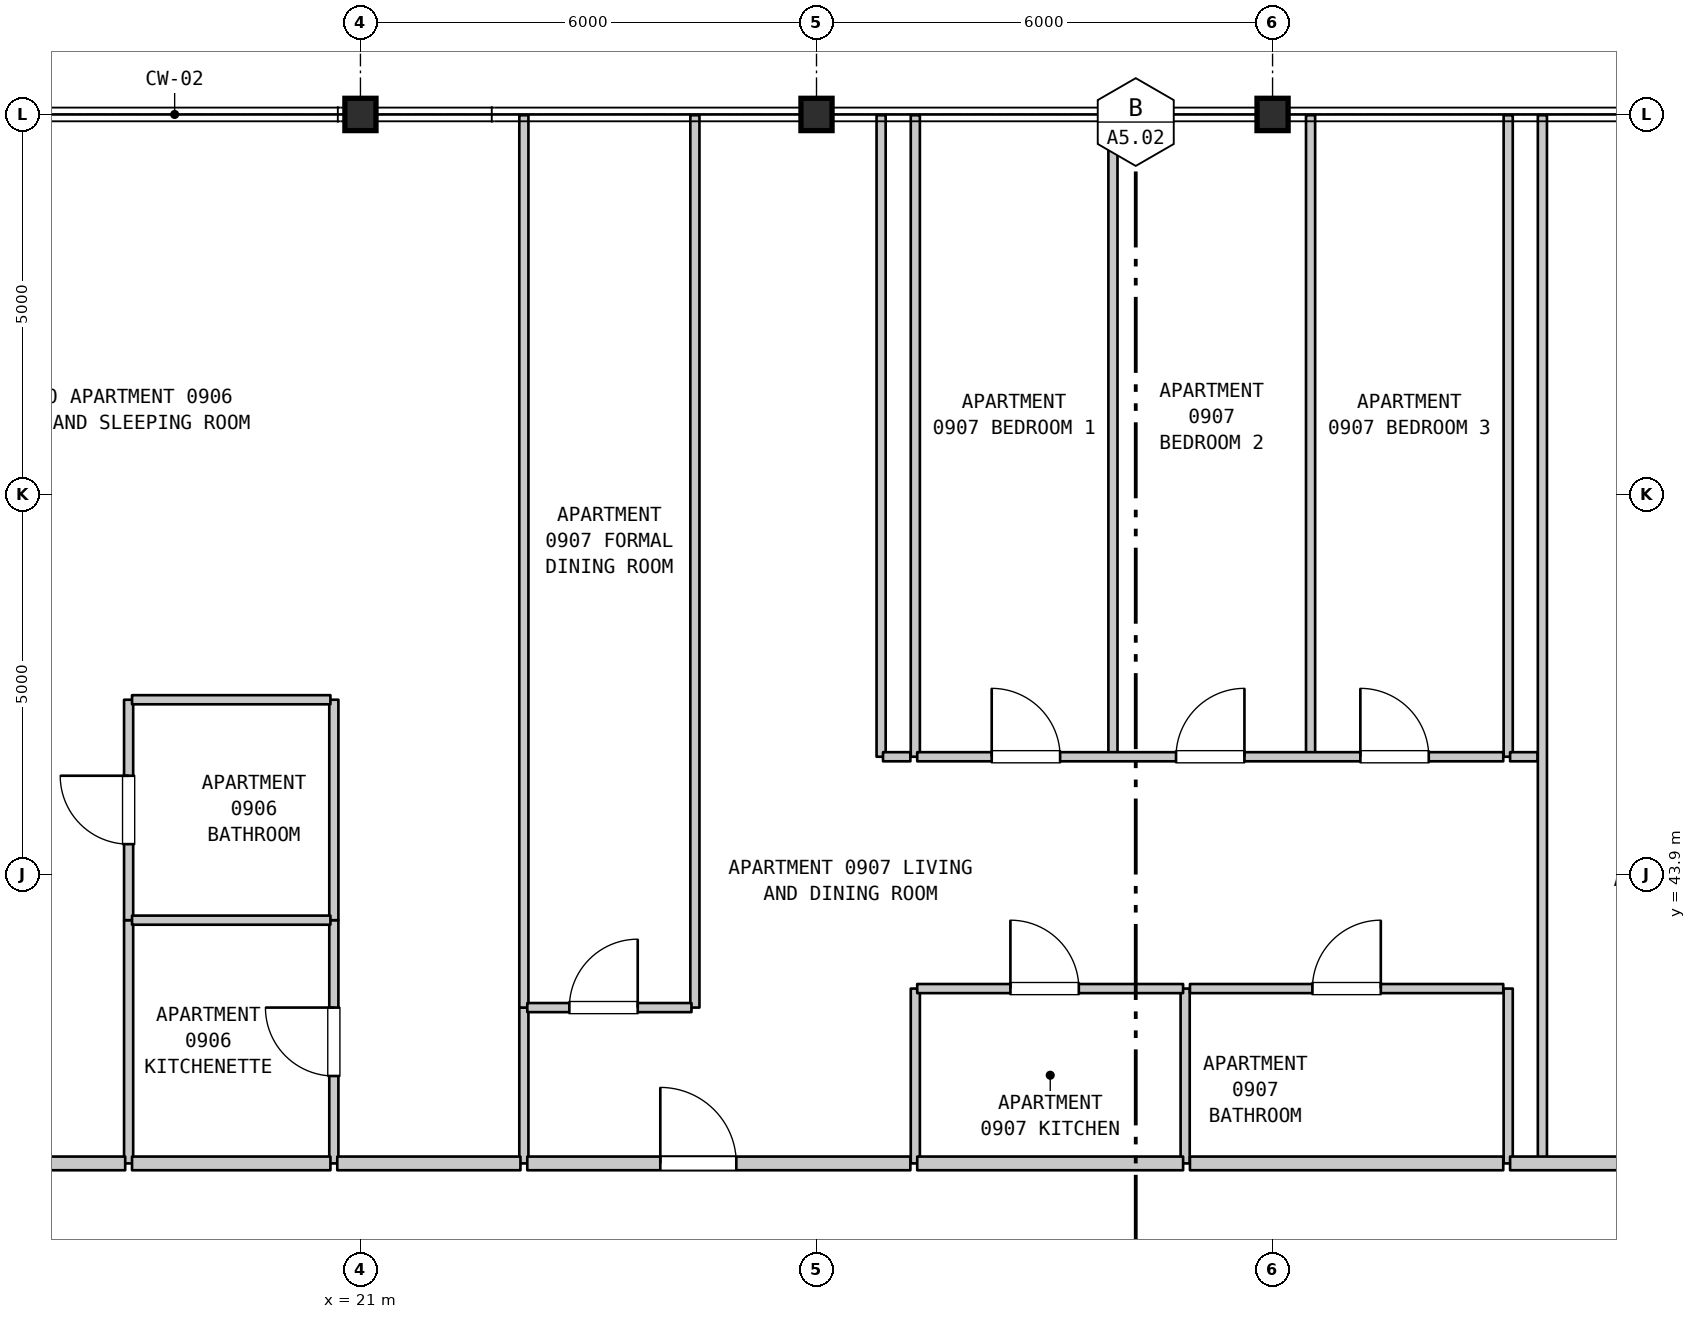
"""IFC4 building model, lengths in metres.
Left out: names, types, materials, properties, quantities, classifications, styles, units other than length and angle.
Written with IfcOpenShell. Run it as: python <this file> out.ifc"""

import sys

from ifc_helpers import new_model, si_unit, direction, frame, frame_2d, origin, origin_2d, place, context, subcontext, project, spatial, rectangle, i_section, extrude, element, fill, save


model = new_model("IFC4")
c1 = context("Model", 3, precision=1e-05, world=origin(), true_north=direction((0.0, 1.0)))
c2 = subcontext(c1, "Body", "Model", "MODEL_VIEW")
j1 = project(units=[si_unit("LENGTHUNIT", "METRE"), si_unit("PLANEANGLEUNIT", "RADIAN")], contexts=[c1])
p1 = place(None, origin())
s1 = spatial("IfcSite", under=j1, at=p1, CompositionType="ELEMENT")
p2 = place(p1, origin())
s2 = spatial("IfcBuilding", under=s1, at=p2, CompositionType="ELEMENT")
p3 = place(p2, frame((0.0, 0.0, 42.5)))
s3 = spatial("IfcBuildingStorey", under=s2, at=p3, CompositionType="ELEMENT", Elevation=42.5)
for number, where, z_axis, x_axis in (
    (1, (21.0, 53.9, 0.0), (0.0, 0.0, 1.0), (1.0, 0.0, 0.0)),
    (2, (27.0, 53.9, 0.0), (0.0, 0.0, 1.0), (1.0, 0.0, 0.0)),
    (3, (33.0, 53.9, 0.0), (0.0, 0.0, 1.0), (1.0, 0.0, 0.0)),
):
    element("IfcColumn", number, at=place(p3, frame(where, z_axis=z_axis, x_axis=x_axis)), inside=s3, PredefinedType="COLUMN", context=c2, shape_type="SweptSolid", body=[
        extrude(i_section(OverallWidth=0.409, OverallDepth=0.425, WebThickness=0.032, FlangeThickness=0.052, FilletRadius=0.015, at=origin_2d()), origin(), (0.0, 0.0, 1.0), 3.7),
    ])
p4 = place(p3, frame((17.95, 40.1, 0.0), z_axis=(0.0, 0.0, 1.0), x_axis=(0.0, 1.0, 0.0)))
e4 = element("IfcWall", 4, at=p4, inside=s3, PredefinedType="PARTITIONING", context=c2, shape_type="SweptSolid", body=[
    extrude(rectangle(XDim=3.2, YDim=0.12, at=frame_2d((1.6, 0.0))), origin(), (0.0, 0.0, 1.0), 3.385),
])
p5 = place(p3, frame((17.95, 43.3, 0.0), z_axis=(0.0, 0.0, 1.0), x_axis=(0.0, 1.0, 0.0)))
e5 = element("IfcWall", 5, at=p5, inside=s3, PredefinedType="PARTITIONING", context=c2, shape_type="SweptSolid", body=[
    extrude(rectangle(XDim=2.9, YDim=0.12, at=frame_2d((1.45, 0.0))), origin(), (0.0, 0.0, 1.0), 3.385),
])
p6 = place(p5, frame((1.0, 0.0, 0.0)))
e6 = element("IfcOpeningElement", 6, at=p6, cuts=e5, PredefinedType="OPENING", context=c2, shape_type="SweptSolid", body=[
    extrude(rectangle(XDim=0.9, YDim=2.1, at=frame_2d((0.45, 1.05))), frame((0.0, 0.07, 0.0), z_axis=(0.0, -1.0, 0.0), x_axis=(1.0, 0.0, 0.0)), (0.0, 0.0, 1.0), 0.14),
])
p7 = place(p3, frame((20.65, 40.1, 0.0), z_axis=(0.0, 0.0, 1.0), x_axis=(0.0, 1.0, 0.0)))
e7 = element("IfcWall", 7, at=p7, inside=s3, PredefinedType="PARTITIONING", context=c2, shape_type="SweptSolid", body=[
    extrude(rectangle(XDim=3.2, YDim=0.12, at=frame_2d((1.6, 0.0))), origin(), (0.0, 0.0, 1.0), 3.385),
])
p8 = place(p7, frame((1.15, 0.0, 0.0)))
e8 = element("IfcOpeningElement", 8, at=p8, cuts=e7, PredefinedType="OPENING", context=c2, shape_type="SweptSolid", body=[
    extrude(rectangle(XDim=0.9, YDim=2.15, at=frame_2d((0.45, 1.075))), frame((0.0, 0.07, 0.0), z_axis=(0.0, -1.0, 0.0), x_axis=(1.0, 0.0, 0.0)), (0.0, 0.0, 1.0), 0.14),
])
p9 = place(p3, frame((20.65, 43.3, 0.0), z_axis=(0.0, 0.0, 1.0), x_axis=(0.0, 1.0, 0.0)))
e9 = element("IfcWall", 9, at=p9, inside=s3, PredefinedType="PARTITIONING", context=c2, shape_type="SweptSolid", body=[
    extrude(rectangle(XDim=2.9, YDim=0.12, at=frame_2d((1.45, 0.0))), origin(), (0.0, 0.0, 1.0), 3.385),
])
p10 = place(p3, frame((23.15, 40.1, 0.0), z_axis=(0.0, 0.0, 1.0), x_axis=(0.0, 1.0, 0.0)))
e10 = element("IfcWall", 10, at=p10, inside=s3, PredefinedType="PARTITIONING", context=c2, shape_type="SweptSolid", body=[
    extrude(rectangle(XDim=2.05, YDim=0.12, at=frame_2d((1.025, 0.0))), origin(), (0.0, 0.0, 1.0), 3.385),
])
for number, where, z_axis, x_axis in (
    (11, (23.15, 42.15, 0.0), (0.0, 0.0, 1.0), (0.0, 1.0, 0.0)),
    (12, (25.4, 42.15, 0.0), (0.0, 0.0, 1.0), (0.0, 1.0, 0.0)),
):
    element("IfcWall", number, at=place(p3, frame(where, z_axis=z_axis, x_axis=x_axis)), inside=s3, PredefinedType="PARTITIONING", context=c2, shape_type="SweptSolid", body=[
        extrude(rectangle(XDim=11.74, YDim=0.12, at=frame_2d((5.87, 0.0))), origin(), (0.0, 0.0, 1.0), 3.385),
    ])
p11 = place(p3, frame((27.85, 45.45, 0.0), z_axis=(0.0, 0.0, 1.0), x_axis=(0.0, 1.0, 0.0)))
e13 = element("IfcWall", 13, at=p11, inside=s3, PredefinedType="PARTITIONING", context=c2, shape_type="SweptSolid", body=[
    extrude(rectangle(XDim=8.44, YDim=0.12, at=frame_2d((4.22, 0.0))), origin(), (0.0, 0.0, 1.0), 3.385),
])
p12 = place(p3, frame((28.3, 40.1, 0.0), z_axis=(0.0, 0.0, 1.0), x_axis=(0.0, 1.0, 0.0)))
e14 = element("IfcWall", 14, at=p12, inside=s3, PredefinedType="PARTITIONING", context=c2, shape_type="SweptSolid", body=[
    extrude(rectangle(XDim=2.3, YDim=0.12, at=frame_2d((1.15, 0.0))), origin(), (0.0, 0.0, 1.0), 3.385),
])
for number, where, z_axis, x_axis in (
    (15, (28.3, 45.45, 0.0), (0.0, 0.0, 1.0), (0.0, 1.0, 0.0)),
    (16, (30.9, 45.45, 0.0), (0.0, 0.0, 1.0), (0.0, 1.0, 0.0)),
):
    element("IfcWall", number, at=place(p3, frame(where, z_axis=z_axis, x_axis=x_axis)), inside=s3, PredefinedType="PARTITIONING", context=c2, shape_type="SweptSolid", body=[
        extrude(rectangle(XDim=8.44, YDim=0.12, at=frame_2d((4.22, 0.0))), origin(), (0.0, 0.0, 1.0), 3.385),
    ])
p13 = place(p3, frame((31.85, 40.1, 0.0), z_axis=(0.0, 0.0, 1.0), x_axis=(0.0, 1.0, 0.0)))
e17 = element("IfcWall", 17, at=p13, inside=s3, PredefinedType="PARTITIONING", context=c2, shape_type="SweptSolid", body=[
    extrude(rectangle(XDim=2.3, YDim=0.12, at=frame_2d((1.15, 0.0))), origin(), (0.0, 0.0, 1.0), 3.385),
])
p14 = place(p3, frame((33.5, 45.45, 0.0), z_axis=(0.0, 0.0, 1.0), x_axis=(0.0, 1.0, 0.0)))
e18 = element("IfcWall", 18, at=p14, inside=s3, PredefinedType="PARTITIONING", context=c2, shape_type="SweptSolid", body=[
    extrude(rectangle(XDim=8.44, YDim=0.12, at=frame_2d((4.22, 0.0))), origin(), (0.0, 0.0, 1.0), 3.385),
])
p15 = place(p3, frame((36.1, 40.1, 0.0), z_axis=(0.0, 0.0, 1.0), x_axis=(0.0, 1.0, 0.0)))
e19 = element("IfcWall", 19, at=p15, inside=s3, PredefinedType="PARTITIONING", context=c2, shape_type="SweptSolid", body=[
    extrude(rectangle(XDim=2.3, YDim=0.12, at=frame_2d((1.15, 0.0))), origin(), (0.0, 0.0, 1.0), 3.385),
])
p16 = place(p3, frame((36.1, 45.45, 0.0), z_axis=(0.0, 0.0, 1.0), x_axis=(0.0, 1.0, 0.0)))
e20 = element("IfcWall", 20, at=p16, inside=s3, PredefinedType="PARTITIONING", context=c2, shape_type="SweptSolid", body=[
    extrude(rectangle(XDim=8.44, YDim=0.12, at=frame_2d((4.22, 0.0))), origin(), (0.0, 0.0, 1.0), 3.385),
])
p17 = place(p3, frame((36.55, 40.1, 0.0), z_axis=(0.0, 0.0, 1.0), x_axis=(0.0, 1.0, 0.0)))
e21 = element("IfcWall", 21, at=p17, inside=s3, PredefinedType="PARTITIONING", context=c2, shape_type="SweptSolid", body=[
    extrude(rectangle(XDim=13.79, YDim=0.12, at=frame_2d((6.895, 0.0))), origin(), (0.0, 0.0, 1.0), 3.385),
])
p18 = place(p3, frame((12.875, 40.1, 0.0), z_axis=(0.0, 0.0, 1.0), x_axis=(1.0, 0.0, 0.0)))
e22 = element("IfcWall", 22, at=p18, inside=s3, PredefinedType="STANDARD", context=c2, shape_type="SweptSolid", body=[
    extrude(rectangle(XDim=5.03, YDim=0.18, at=frame_2d((2.515, 0.0))), origin(), (0.0, 0.0, 1.0), 3.385),
])
p19 = place(p18, frame((2.0, 0.0, 0.0)))
e23 = element("IfcOpeningElement", 23, at=p19, cuts=e22, PredefinedType="OPENING", context=c2, shape_type="SweptSolid", body=[
    extrude(rectangle(XDim=1.0, YDim=2.15, at=frame_2d((0.5, 1.075))), frame((0.0, 0.1, 0.0), z_axis=(0.0, -1.0, 0.0), x_axis=(1.0, 0.0, 0.0)), (0.0, 0.0, 1.0), 0.2),
])
p20 = place(p3, frame((17.995, 40.1, 0.0), z_axis=(0.0, 0.0, 1.0), x_axis=(1.0, 0.0, 0.0)))
e24 = element("IfcWall", 24, at=p20, inside=s3, PredefinedType="STANDARD", context=c2, shape_type="SweptSolid", body=[
    extrude(rectangle(XDim=2.61, YDim=0.18, at=frame_2d((1.305, 0.0))), origin(), (0.0, 0.0, 1.0), 3.385),
])
p21 = place(p3, frame((20.695, 40.1, 0.0), z_axis=(0.0, 0.0, 1.0), x_axis=(1.0, 0.0, 0.0)))
e25 = element("IfcWall", 25, at=p21, inside=s3, PredefinedType="STANDARD", context=c2, shape_type="SweptSolid", body=[
    extrude(rectangle(XDim=2.41, YDim=0.18, at=frame_2d((1.205, 0.0))), origin(), (0.0, 0.0, 1.0), 3.385),
])
p22 = place(p3, frame((23.195, 40.1, 0.0), z_axis=(0.0, 0.0, 1.0), x_axis=(1.0, 0.0, 0.0)))
e26 = element("IfcWall", 26, at=p22, inside=s3, PredefinedType="STANDARD", context=c2, shape_type="SweptSolid", body=[
    extrude(rectangle(XDim=5.04, YDim=0.18, at=frame_2d((2.52, 0.0))), origin(), (0.0, 0.0, 1.0), 3.385),
])
p23 = place(p22, frame((1.75, 0.0, 0.0)))
e27 = element("IfcOpeningElement", 27, at=p23, cuts=e26, PredefinedType="OPENING", context=c2, shape_type="SweptSolid", body=[
    extrude(rectangle(XDim=1.0, YDim=2.15, at=frame_2d((0.5, 1.075))), frame((0.0, 0.1, 0.0), z_axis=(0.0, -1.0, 0.0), x_axis=(1.0, 0.0, 0.0)), (0.0, 0.0, 1.0), 0.2),
])
p24 = place(p3, frame((28.325, 40.1, 0.0), z_axis=(0.0, 0.0, 1.0), x_axis=(1.0, 0.0, 0.0)))
e28 = element("IfcWall", 28, at=p24, inside=s3, PredefinedType="STANDARD", context=c2, shape_type="SweptSolid", body=[
    extrude(rectangle(XDim=3.498, YDim=0.18, at=frame_2d((1.749, 0.0))), origin(), (0.0, 0.0, 1.0), 3.385),
])
p25 = place(p3, frame((31.913, 40.1, 0.0), z_axis=(0.0, 0.0, 1.0), x_axis=(1.0, 0.0, 0.0)))
e29 = element("IfcWall", 29, at=p25, inside=s3, PredefinedType="STANDARD", context=c2, shape_type="SweptSolid", body=[
    extrude(rectangle(XDim=4.122, YDim=0.18, at=frame_2d((2.061, 0.0))), origin(), (0.0, 0.0, 1.0), 3.385),
])
p26 = place(p3, frame((36.125, 40.1, 0.0), z_axis=(0.0, 0.0, 1.0), x_axis=(1.0, 0.0, 0.0)))
e30 = element("IfcWall", 30, at=p26, inside=s3, PredefinedType="STANDARD", context=c2, shape_type="SweptSolid", body=[
    extrude(rectangle(XDim=5.14, YDim=0.18, at=frame_2d((2.57, 0.0))), origin(), (0.0, 0.0, 1.0), 3.385),
])
p27 = place(p26, frame((2.198, 0.0, 0.0)))
e31 = element("IfcOpeningElement", 31, at=p27, cuts=e30, PredefinedType="OPENING", context=c2, shape_type="SweptSolid", body=[
    extrude(rectangle(XDim=1.0, YDim=2.15, at=frame_2d((0.5, 1.075))), frame((0.0, 0.1, 0.0), z_axis=(0.0, -1.0, 0.0), x_axis=(1.0, 0.0, 0.0)), (0.0, 0.0, 1.0), 0.2),
])
p28 = place(p3, frame((23.195, 42.15, 0.0), z_axis=(0.0, 0.0, 1.0), x_axis=(1.0, 0.0, 0.0)))
e32 = element("IfcWall", 32, at=p28, inside=s3, PredefinedType="PARTITIONING", context=c2, shape_type="SweptSolid", body=[
    extrude(rectangle(XDim=2.16, YDim=0.12, at=frame_2d((1.08, 0.0))), origin(), (0.0, 0.0, 1.0), 3.385),
])
p29 = place(p28, frame((0.553, 0.0, 0.0)))
e33 = element("IfcOpeningElement", 33, at=p29, cuts=e32, PredefinedType="OPENING", context=c2, shape_type="SweptSolid", body=[
    extrude(rectangle(XDim=0.9, YDim=2.15, at=frame_2d((0.45, 1.075))), frame((0.0, 0.07, 0.0), z_axis=(0.0, -1.0, 0.0), x_axis=(1.0, 0.0, 0.0)), (0.0, 0.0, 1.0), 0.14),
])
p30 = place(p3, frame((28.325, 42.4, 0.0), z_axis=(0.0, 0.0, 1.0), x_axis=(1.0, 0.0, 0.0)))
e34 = element("IfcWall", 34, at=p30, inside=s3, PredefinedType="PARTITIONING", context=c2, shape_type="SweptSolid", body=[
    extrude(rectangle(XDim=3.498, YDim=0.12, at=frame_2d((1.749, 0.0))), origin(), (0.0, 0.0, 1.0), 3.385),
])
p31 = place(p30, frame((1.226, 0.0, 0.0)))
e35 = element("IfcOpeningElement", 35, at=p31, cuts=e34, PredefinedType="OPENING", context=c2, shape_type="SweptSolid", body=[
    extrude(rectangle(XDim=0.9, YDim=2.15, at=frame_2d((0.45, 1.075))), frame((0.0, 0.07, 0.0), z_axis=(0.0, -1.0, 0.0), x_axis=(1.0, 0.0, 0.0)), (0.0, 0.0, 1.0), 0.14),
])
p32 = place(p3, frame((31.913, 42.4, 0.0), z_axis=(0.0, 0.0, 1.0), x_axis=(1.0, 0.0, 0.0)))
e36 = element("IfcWall", 36, at=p32, inside=s3, PredefinedType="PARTITIONING", context=c2, shape_type="SweptSolid", body=[
    extrude(rectangle(XDim=4.122, YDim=0.12, at=frame_2d((2.061, 0.0))), origin(), (0.0, 0.0, 1.0), 3.385),
])
p33 = place(p32, frame((1.611, 0.0, 0.0)))
e37 = element("IfcOpeningElement", 37, at=p33, cuts=e36, PredefinedType="OPENING", context=c2, shape_type="SweptSolid", body=[
    extrude(rectangle(XDim=0.9, YDim=2.1, at=frame_2d((0.45, 1.05))), frame((0.0, 0.07, 0.0), z_axis=(0.0, -1.0, 0.0), x_axis=(1.0, 0.0, 0.0)), (0.0, 0.0, 1.0), 0.14),
])
p34 = place(p3, frame((17.995, 43.3, 0.0), z_axis=(0.0, 0.0, 1.0), x_axis=(1.0, 0.0, 0.0)))
e38 = element("IfcWall", 38, at=p34, inside=s3, PredefinedType="PARTITIONING", context=c2, shape_type="SweptSolid", body=[
    extrude(rectangle(XDim=2.61, YDim=0.12, at=frame_2d((1.305, 0.0))), origin(), (0.0, 0.0, 1.0), 3.385),
])
p35 = place(p3, frame((27.875, 45.45, 0.0), z_axis=(0.0, 0.0, 1.0), x_axis=(1.0, 0.0, 0.0)))
e39 = element("IfcWall", 39, at=p35, inside=s3, PredefinedType="PARTITIONING", context=c2, shape_type="SweptSolid", body=[
    extrude(rectangle(XDim=0.36, YDim=0.12, at=frame_2d((0.18, 0.0))), origin(), (0.0, 0.0, 1.0), 3.385),
])
p36 = place(p3, frame((28.325, 45.45, 0.0), z_axis=(0.0, 0.0, 1.0), x_axis=(1.0, 0.0, 0.0)))
e40 = element("IfcWall", 40, at=p36, inside=s3, PredefinedType="PARTITIONING", context=c2, shape_type="SweptSolid", body=[
    extrude(rectangle(XDim=7.71, YDim=0.12, at=frame_2d((3.855, 0.0))), origin(), (0.0, 0.0, 1.0), 3.385),
])
p37 = place(p36, frame((0.98, 0.0, 0.0)))
e41 = element("IfcOpeningElement", 41, at=p37, cuts=e40, PredefinedType="OPENING", context=c2, shape_type="SweptSolid", body=[
    extrude(rectangle(XDim=0.9, YDim=2.15, at=frame_2d((0.45, 1.075))), frame((0.0, 0.07, 0.0), z_axis=(0.0, -1.0, 0.0), x_axis=(1.0, 0.0, 0.0)), (0.0, 0.0, 1.0), 0.14),
])
p38 = place(p36, frame((3.405, 0.0, 0.0)))
e42 = element("IfcOpeningElement", 42, at=p38, cuts=e40, PredefinedType="OPENING", context=c2, shape_type="SweptSolid", body=[
    extrude(rectangle(XDim=0.9, YDim=2.15, at=frame_2d((0.45, 1.075))), frame((0.0, 0.07, 0.0), z_axis=(0.0, -1.0, 0.0), x_axis=(1.0, 0.0, 0.0)), (0.0, 0.0, 1.0), 0.14),
])
p39 = place(p36, frame((5.83, 0.0, 0.0)))
e43 = element("IfcOpeningElement", 43, at=p39, cuts=e40, PredefinedType="OPENING", context=c2, shape_type="SweptSolid", body=[
    extrude(rectangle(XDim=0.9, YDim=2.15, at=frame_2d((0.45, 1.075))), frame((0.0, 0.07, 0.0), z_axis=(0.0, -1.0, 0.0), x_axis=(1.0, 0.0, 0.0)), (0.0, 0.0, 1.0), 0.14),
])
p40 = place(p3, frame((36.125, 45.45, 0.0), z_axis=(0.0, 0.0, 1.0), x_axis=(1.0, 0.0, 0.0)))
e44 = element("IfcWall", 44, at=p40, inside=s3, PredefinedType="PARTITIONING", context=c2, shape_type="SweptSolid", body=[
    extrude(rectangle(XDim=0.36, YDim=0.12, at=frame_2d((0.18, 0.0))), origin(), (0.0, 0.0, 1.0), 3.385),
])
p41 = place(p3, frame((17.995, 46.2, 0.0), z_axis=(0.0, 0.0, 1.0), x_axis=(1.0, 0.0, 0.0)))
e45 = element("IfcWall", 45, at=p41, inside=s3, PredefinedType="PARTITIONING", context=c2, shape_type="SweptSolid", body=[
    extrude(rectangle(XDim=2.61, YDim=0.12, at=frame_2d((1.305, 0.0))), origin(), (0.0, 0.0, 1.0), 3.385),
])
p42 = place(p6, origin())
e46 = element("IfcDoor", 46, at=p42, inside=s3, OperationType="SINGLE_SWING_RIGHT", PredefinedType="DOOR", context=c2, shape_type="SweptSolid", body=[
    extrude(rectangle(XDim=0.9, YDim=2.1, at=frame_2d((0.45, 1.05))), frame((0.0, 0.025, 0.0), z_axis=(0.0, -1.0, 0.0), x_axis=(1.0, 0.0, 0.0)), (0.0, 0.0, 1.0), 0.05),
])
fill(e6, e46)
p43 = place(p8, origin())
e47 = element("IfcDoor", 47, at=p43, inside=s3, OperationType="SINGLE_SWING_RIGHT", PredefinedType="DOOR", context=c2, shape_type="SweptSolid", body=[
    extrude(rectangle(XDim=0.9, YDim=2.15, at=frame_2d((0.45, 1.075))), frame((0.0, 0.025, 0.0), z_axis=(0.0, -1.0, 0.0), x_axis=(1.0, 0.0, 0.0)), (0.0, 0.0, 1.0), 0.05),
])
fill(e8, e47)
p44 = place(p23, origin())
e48 = element("IfcDoor", 48, at=p44, inside=s3, OperationType="SINGLE_SWING_LEFT", PredefinedType="DOOR", context=c2, shape_type="SweptSolid", body=[
    extrude(rectangle(XDim=1.0, YDim=2.15, at=frame_2d((0.5, 1.075))), frame((0.0, 0.025, 0.0), z_axis=(0.0, -1.0, 0.0), x_axis=(1.0, 0.0, 0.0)), (0.0, 0.0, 1.0), 0.05),
])
fill(e27, e48)
p45 = place(p29, origin())
e49 = element("IfcDoor", 49, at=p45, inside=s3, OperationType="SINGLE_SWING_RIGHT", PredefinedType="DOOR", context=c2, shape_type="SweptSolid", body=[
    extrude(rectangle(XDim=0.9, YDim=2.15, at=frame_2d((0.45, 1.075))), frame((0.0, 0.025, 0.0), z_axis=(0.0, -1.0, 0.0), x_axis=(1.0, 0.0, 0.0)), (0.0, 0.0, 1.0), 0.05),
])
fill(e33, e49)
p46 = place(p31, origin())
e50 = element("IfcDoor", 50, at=p46, inside=s3, OperationType="SINGLE_SWING_LEFT", PredefinedType="DOOR", context=c2, shape_type="SweptSolid", body=[
    extrude(rectangle(XDim=0.9, YDim=2.15, at=frame_2d((0.45, 1.075))), frame((0.0, 0.025, 0.0), z_axis=(0.0, -1.0, 0.0), x_axis=(1.0, 0.0, 0.0)), (0.0, 0.0, 1.0), 0.05),
])
fill(e35, e50)
p47 = place(p33, origin())
e51 = element("IfcDoor", 51, at=p47, inside=s3, OperationType="SINGLE_SWING_RIGHT", PredefinedType="DOOR", context=c2, shape_type="SweptSolid", body=[
    extrude(rectangle(XDim=0.9, YDim=2.1, at=frame_2d((0.45, 1.05))), frame((0.0, 0.025, 0.0), z_axis=(0.0, -1.0, 0.0), x_axis=(1.0, 0.0, 0.0)), (0.0, 0.0, 1.0), 0.05),
])
fill(e37, e51)
p48 = place(p37, origin())
e52 = element("IfcDoor", 52, at=p48, inside=s3, OperationType="SINGLE_SWING_LEFT", PredefinedType="DOOR", context=c2, shape_type="SweptSolid", body=[
    extrude(rectangle(XDim=0.9, YDim=2.15, at=frame_2d((0.45, 1.075))), frame((0.0, 0.025, 0.0), z_axis=(0.0, -1.0, 0.0), x_axis=(1.0, 0.0, 0.0)), (0.0, 0.0, 1.0), 0.05),
])
fill(e41, e52)
p49 = place(p38, origin())
e53 = element("IfcDoor", 53, at=p49, inside=s3, OperationType="SINGLE_SWING_RIGHT", PredefinedType="DOOR", context=c2, shape_type="SweptSolid", body=[
    extrude(rectangle(XDim=0.9, YDim=2.15, at=frame_2d((0.45, 1.075))), frame((0.0, 0.025, 0.0), z_axis=(0.0, -1.0, 0.0), x_axis=(1.0, 0.0, 0.0)), (0.0, 0.0, 1.0), 0.05),
])
fill(e42, e53)
p50 = place(p39, origin())
e54 = element("IfcDoor", 54, at=p50, inside=s3, OperationType="SINGLE_SWING_LEFT", PredefinedType="DOOR", context=c2, shape_type="SweptSolid", body=[
    extrude(rectangle(XDim=0.9, YDim=2.15, at=frame_2d((0.45, 1.075))), frame((0.0, 0.025, 0.0), z_axis=(0.0, -1.0, 0.0), x_axis=(1.0, 0.0, 0.0)), (0.0, 0.0, 1.0), 0.05),
])
fill(e43, e54)
save(model, sys.argv[1])
